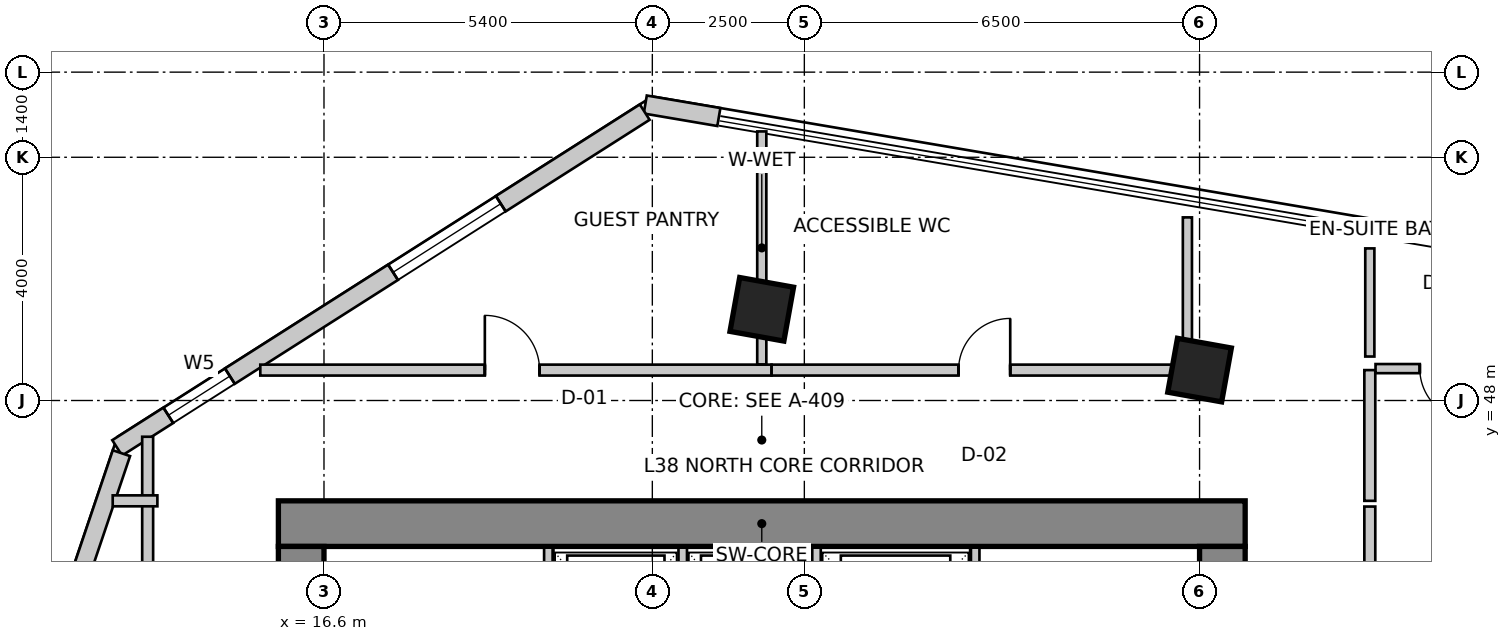
"""IFC4 building model, lengths in metres.
Left out: names, types, materials, properties, quantities, classifications, styles, units other than length and angle.
Written with IfcOpenShell. Run it as: python <this file> out.ifc"""

import sys

from ifc_helpers import new_model, si_unit, direction, frame, frame_2d, origin, origin_2d, place, context, subcontext, project, spatial, rectangle, extrude, source, transform, mapped, element, fill, save


model = new_model("IFC4")
c1 = context("Model", 3, precision=1e-05, world=origin(), true_north=direction((0.0, 1.0)))
c2 = subcontext(c1, "Body", "Model", "MODEL_VIEW")
j1 = project(units=[si_unit("LENGTHUNIT", "METRE"), si_unit("PLANEANGLEUNIT", "RADIAN")], contexts=[c1])
p1 = place(None, origin())
s1 = spatial("IfcSite", under=j1, at=p1, CompositionType="ELEMENT")
p2 = place(p1, origin())
s2 = spatial("IfcBuilding", under=s1, at=p2, CompositionType="ELEMENT")
p3 = place(p2, frame((0.0, 0.0, 153.8)))
s3 = spatial("IfcBuildingStorey", under=s2, at=p3, CompositionType="ELEMENT", Elevation=153.8)
p4 = place(p3, frame((15.85, 45.975, 0.0), z_axis=(0.0, 0.0, 1.0), x_axis=(1.0, 0.0, 0.0)))
e1 = element("IfcWall", 1, at=p4, inside=s3, PredefinedType="SHEAR", context=c2, shape_type="SweptSolid", body=[
    extrude(rectangle(XDim=15.9, YDim=0.75, at=frame_2d((7.95, 0.0))), origin(), (0.0, 0.0, 1.0), 3.6),
])
p5 = place(p3, frame((16.225, 34.2, 0.0), z_axis=(0.0, 0.0, 1.0), x_axis=(0.0, 1.0, 0.0)))
e2 = element("IfcWall", 2, at=p5, inside=s3, PredefinedType="SHEAR", context=c2, shape_type="SweptSolid", body=[
    extrude(rectangle(XDim=11.4, YDim=0.75, at=frame_2d((5.7, 0.0))), origin(), (0.0, 0.0, 1.0), 3.6),
])
m1 = source(origin(), c2, "Body", "SweptSolid", [
    extrude(rectangle(XDim=1.1, YDim=2.15, at=frame_2d((0.55, 1.075))), frame((0.0, 0.385, 0.0), z_axis=(0.0, -1.0, 0.0), x_axis=(1.0, 0.0, 0.0)), (0.0, 0.0, 1.0), 0.77),
])
p6 = place(p5, frame((7.15, 0.0, 0.0)))
e3 = element("IfcOpeningElement", 3, at=p6, cuts=e2, PredefinedType="OPENING", context=c2, shape_type="MappedRepresentation", body=[
    mapped(m1, transform((0.0, 0.0, 0.0), scale=1.0)),
])
p7 = place(p3, frame((31.375, 34.2, 0.0), z_axis=(0.0, 0.0, 1.0), x_axis=(0.0, 1.0, 0.0)))
e4 = element("IfcWall", 4, at=p7, inside=s3, PredefinedType="SHEAR", context=c2, shape_type="SweptSolid", body=[
    extrude(rectangle(XDim=11.4, YDim=0.75, at=frame_2d((5.7, 0.0))), origin(), (0.0, 0.0, 1.0), 3.6),
])
p8 = place(p7, frame((7.35, 0.0, 0.0)))
e5 = element("IfcOpeningElement", 5, at=p8, cuts=e4, PredefinedType="OPENING", context=c2, shape_type="MappedRepresentation", body=[
    mapped(m1, transform((0.0, 0.0, 0.0), scale=1.0)),
])
m2 = source(origin(), c2, "Body", "SweptSolid", [
    extrude(rectangle(XDim=0.9, YDim=0.9, at=origin_2d()), origin(), (0.0, 0.0, 1.0), 3.6),
])
for number, where, z_axis, x_axis in (
    (6, (23.8, 49.5, 0.0), (0.0, 0.0, 1.0), (0.984, -0.177, 0.0)),
    (7, (31.0, 48.5, 0.0), (0.0, 0.0, 1.0), (0.984, -0.177, 0.0)),
):
    element("IfcColumn", number, at=place(p3, frame(where, z_axis=z_axis, x_axis=x_axis)), inside=s3, PredefinedType="COLUMN", context=c2, shape_type="MappedRepresentation", body=[
        mapped(m2, transform((0.0, 0.0, 0.0), scale=1.0)),
    ])
p9 = place(p3, frame((23.094, 52.662, 0.0), z_axis=(0.0, 0.0, 1.0), x_axis=(-0.985845658291, 0.167655414553, 0.0)))
e8 = element("IfcWall", 8, at=p9, inside=s3, PredefinedType="SOLIDWALL", context=c2, shape_type="SweptSolid", body=[
    extrude(rectangle(XDim=1.228, YDim=0.3, at=frame_2d((0.614, 0.0))), origin(), (0.0, 0.0, 1.0), 3.35),
])
p10 = place(p3, frame((21.875, 52.742, 0.0), z_axis=(0.0, 0.0, 1.0), x_axis=(-0.843662465249, -0.536873956092, 0.0)))
e9 = element("IfcWall", 9, at=p10, inside=s3, PredefinedType="SOLIDWALL", context=c2, shape_type="SweptSolid", body=[
    extrude(rectangle(XDim=10.284, YDim=0.3, at=frame_2d((5.142, 0.0))), origin(), (0.0, 0.0, 1.0), 3.35),
])
m3 = source(origin(), c2, "Body", "SweptSolid", [
    extrude(rectangle(XDim=2.1, YDim=2.0, at=frame_2d((1.05, 1.0))), frame((0.0, 0.16, 0.0), z_axis=(0.0, -1.0, 0.0), x_axis=(1.0, 0.0, 0.0)), (0.0, 0.0, 1.0), 0.32),
])
p11 = place(p10, frame((2.806, 0.0, 0.85)))
e10 = element("IfcOpeningElement", 10, at=p11, cuts=e9, PredefinedType="OPENING", context=c2, shape_type="MappedRepresentation", body=[
    mapped(m3, transform((0.0, 0.0, 0.0), scale=1.0)),
])
m4 = source(origin(), c2, "Body", "SweptSolid", [
    extrude(rectangle(XDim=1.2, YDim=1.6, at=frame_2d((0.6, 0.8))), frame((0.0, 0.16, 0.0), z_axis=(0.0, -1.0, 0.0), x_axis=(1.0, 0.0, 0.0)), (0.0, 0.0, 1.0), 0.32),
])
p12 = place(p10, frame((8.087, 0.0, 0.85)))
e11 = element("IfcOpeningElement", 11, at=p12, cuts=e9, PredefinedType="OPENING", context=c2, shape_type="MappedRepresentation", body=[
    mapped(m4, transform((0.0, 0.0, 0.0), scale=1.0)),
])
p13 = place(p3, frame((13.269, 47.134, 0.0), z_axis=(0.0, 0.0, 1.0), x_axis=(-0.319929773322, -0.947441259468, 0.0)))
e12 = element("IfcWall", 12, at=p13, inside=s3, PredefinedType="SOLIDWALL", context=c2, shape_type="SweptSolid", body=[
    extrude(rectangle(XDim=16.134, YDim=0.3, at=frame_2d((8.067, 0.0))), origin(), (0.0, 0.0, 1.0), 3.35),
])
m5 = source(origin(), c2, "Body", "SweptSolid", [
    extrude(rectangle(XDim=2.4, YDim=2.2, at=frame_2d((1.2, 1.1))), frame((0.0, 0.16, 0.0), z_axis=(0.0, -1.0, 0.0), x_axis=(1.0, 0.0, 0.0)), (0.0, 0.0, 1.0), 0.32),
])
p14 = place(p13, frame((2.276, 0.0, 0.85)))
e13 = element("IfcOpeningElement", 13, at=p14, cuts=e12, PredefinedType="OPENING", context=c2, shape_type="MappedRepresentation", body=[
    mapped(m5, transform((0.0, 0.0, 0.0), scale=1.0)),
])
p15 = place(p13, frame((7.361, 0.0, 0.85)))
e14 = element("IfcOpeningElement", 14, at=p15, cuts=e12, PredefinedType="OPENING", context=c2, shape_type="MappedRepresentation", body=[
    mapped(m3, transform((0.0, 0.0, 0.0), scale=1.0)),
])
p16 = place(p13, frame((12.146, 0.0, 0.85)))
e15 = element("IfcOpeningElement", 15, at=p16, cuts=e12, PredefinedType="OPENING", context=c2, shape_type="MappedRepresentation", body=[
    mapped(m5, transform((0.0, 0.0, 0.0), scale=1.0)),
])
for number, where, z_axis, x_axis in (
    (16, (20.29, 43.28, 0.0), (0.0, 0.0, 1.0), (0.0, 1.0, 0.0)),
    (17, (27.31, 43.28, 0.0), (0.0, 0.0, 1.0), (0.0, 1.0, 0.0)),
):
    element("IfcWall", number, at=place(p3, frame(where, z_axis=z_axis, x_axis=x_axis)), inside=s3, PredefinedType="SOLIDWALL", context=c2, shape_type="SweptSolid", body=[
        extrude(rectangle(XDim=2.3, YDim=0.14, at=frame_2d((1.15, 0.0))), origin(), (0.0, 0.0, 1.0), 3.35),
    ])
for number, where, z_axis, x_axis in (
    (18, (22.5, 43.02, 0.0), (0.0, 0.0, 1.0), (0.0, 1.0, 0.0)),
    (19, (24.7, 43.02, 0.0), (0.0, 0.0, 1.0), (0.0, 1.0, 0.0)),
):
    element("IfcWall", number, at=place(p3, frame(where, z_axis=z_axis, x_axis=x_axis)), inside=s3, PredefinedType="SOLIDWALL", context=c2, shape_type="SweptSolid", body=[
        extrude(rectangle(XDim=2.56, YDim=0.14, at=frame_2d((1.28, 0.0))), origin(), (0.0, 0.0, 1.0), 3.35),
    ])
p17 = place(p3, frame((13.7, 33.544, 0.0), z_axis=(0.0, 0.0, 1.0), x_axis=(0.0, 1.0, 0.0)))
e20 = element("IfcWall", 20, at=p17, inside=s3, PredefinedType="PARTITIONING", context=c2, shape_type="SweptSolid", body=[
    extrude(rectangle(XDim=13.86, YDim=0.18, at=frame_2d((6.93, 0.0))), origin(), (0.0, 0.0, 1.0), 2.492),
])
m6 = source(origin(), c2, "Body", "SweptSolid", [
    extrude(rectangle(XDim=0.9, YDim=2.15, at=frame_2d((0.45, 1.075))), frame((0.0, 0.1, 0.0), z_axis=(0.0, -1.0, 0.0), x_axis=(1.0, 0.0, 0.0)), (0.0, 0.0, 1.0), 0.2),
])
p18 = place(p17, frame((4.253, 0.0, 0.0)))
e21 = element("IfcOpeningElement", 21, at=p18, cuts=e20, PredefinedType="OPENING", context=c2, shape_type="MappedRepresentation", body=[
    mapped(m6, transform((0.0, 0.0, 0.0), scale=1.0)),
])
p19 = place(p3, frame((13.86, 46.35, 0.0), z_axis=(0.0, 0.0, 1.0), x_axis=(-1.0, 0.0, 0.0)))
e22 = element("IfcWall", 22, at=p19, inside=s3, PredefinedType="PARTITIONING", context=c2, shape_type="SweptSolid", body=[
    extrude(rectangle(XDim=0.735, YDim=0.18, at=frame_2d((0.367, 0.0))), origin(), (0.0, 0.0, 1.0), 3.35),
])
p20 = place(p3, frame((15.552, 48.5, 0.0), z_axis=(0.0, 0.0, 1.0), x_axis=(1.0, 0.0, 0.0)))
e23 = element("IfcWall", 23, at=p20, inside=s3, PredefinedType="PARTITIONING", context=c2, shape_type="SweptSolid", body=[
    extrude(rectangle(XDim=8.407, YDim=0.18, at=frame_2d((4.204, 0.0))), origin(), (0.0, 0.0, 1.0), 3.034),
])
p21 = place(p20, frame((3.693, 0.0, 0.0)))
e24 = element("IfcOpeningElement", 24, at=p21, cuts=e23, PredefinedType="OPENING", context=c2, shape_type="MappedRepresentation", body=[
    mapped(m6, transform((0.0, 0.0, 0.0), scale=1.0)),
])
p22 = place(p3, frame((23.962, 48.5, 0.0), z_axis=(0.0, 0.0, 1.0), x_axis=(1.0, 0.0, 0.0)))
e25 = element("IfcWall", 25, at=p22, inside=s3, PredefinedType="PARTITIONING", context=c2, shape_type="SweptSolid", body=[
    extrude(rectangle(XDim=6.998, YDim=0.18, at=frame_2d((3.499, 0.0))), origin(), (0.0, 0.0, 1.0), 2.492),
])
m7 = source(origin(), c2, "Body", "SweptSolid", [
    extrude(rectangle(XDim=0.85, YDim=2.15, at=frame_2d((0.425, 1.075))), frame((0.0, 0.1, 0.0), z_axis=(0.0, -1.0, 0.0), x_axis=(1.0, 0.0, 0.0)), (0.0, 0.0, 1.0), 0.2),
])
p23 = place(p22, frame((3.074, 0.0, 0.0)))
e26 = element("IfcOpeningElement", 26, at=p23, cuts=e25, PredefinedType="OPENING", context=c2, shape_type="MappedRepresentation", body=[
    mapped(m7, transform((0.0, 0.0, 0.0), scale=1.0)),
])
p24 = place(p3, frame((33.8, 48.5, 0.0), z_axis=(0.0, 0.0, 1.0), x_axis=(0.0, -1.0, 0.0)))
e27 = element("IfcWall", 27, at=p24, inside=s3, PredefinedType="PARTITIONING", context=c2, shape_type="SweptSolid", body=[
    extrude(rectangle(XDim=2.15, YDim=0.18, at=frame_2d((1.075, 0.0))), origin(), (0.0, 0.0, 1.0), 2.492),
])
p25 = place(p3, frame((33.8, 46.256, 0.0), z_axis=(0.0, 0.0, 1.0), x_axis=(0.0, -1.0, 0.0)))
e28 = element("IfcWall", 28, at=p25, inside=s3, PredefinedType="PARTITIONING", context=c2, shape_type="SweptSolid", body=[
    extrude(rectangle(XDim=4.016, YDim=0.18, at=frame_2d((2.008, 0.0))), origin(), (0.0, 0.0, 1.0), 2.922),
])
p26 = place(p3, frame((23.8, 52.425, 0.0), z_axis=(0.0, 0.0, 1.0), x_axis=(0.0, -1.0, 0.0)))
e29 = element("IfcWall", 29, at=p26, inside=s3, PredefinedType="PARTITIONING", context=c2, shape_type="SweptSolid", body=[
    extrude(rectangle(XDim=3.831, YDim=0.15, at=frame_2d((1.916, 0.0))), origin(), (0.0, 0.0, 1.0), 2.492),
])
p27 = place(p3, frame((36.2, 48.524, 0.0), z_axis=(0.0, 0.0, 1.0), x_axis=(-1.0, 0.0, 0.0)))
e30 = element("IfcWall", 30, at=p27, inside=s3, PredefinedType="PARTITIONING", context=c2, shape_type="SweptSolid", body=[
    extrude(rectangle(XDim=2.306, YDim=0.15, at=frame_2d((1.153, 0.0))), origin(), (0.0, 0.0, 1.0), 3.35),
])
m8 = source(origin(), c2, "Body", "SweptSolid", [
    extrude(rectangle(XDim=0.85, YDim=2.15, at=frame_2d((0.425, 1.075))), frame((0.0, 0.085, 0.0), z_axis=(0.0, -1.0, 0.0), x_axis=(1.0, 0.0, 0.0)), (0.0, 0.0, 1.0), 0.17),
])
p28 = place(p27, frame((0.728, 0.0, 0.0)))
e31 = element("IfcOpeningElement", 31, at=p28, cuts=e30, PredefinedType="OPENING", context=c2, shape_type="MappedRepresentation", body=[
    mapped(m8, transform((0.0, 0.0, 0.0), scale=1.0)),
])
p29 = place(p3, frame((30.8, 51.011, 0.0), z_axis=(0.0, 0.0, 1.0), x_axis=(0.0, -1.0, 0.0)))
e32 = element("IfcWall", 32, at=p29, inside=s3, PredefinedType="PARTITIONING", context=c2, shape_type="SweptSolid", body=[
    extrude(rectangle(XDim=2.292, YDim=0.15, at=frame_2d((1.146, 0.0))), origin(), (0.0, 0.0, 1.0), 3.35),
])
p30 = place(p3, frame((33.8, 48.723, 0.0), z_axis=(0.0, 0.0, 1.0), x_axis=(0.0, 1.0, 0.0)))
e33 = element("IfcWall", 33, at=p30, inside=s3, PredefinedType="PARTITIONING", context=c2, shape_type="SweptSolid", body=[
    extrude(rectangle(XDim=1.778, YDim=0.15, at=frame_2d((0.889, 0.0))), origin(), (0.0, 0.0, 1.0), 3.35),
])
m9 = source(origin(), c2, "Body", "SweptSolid", [
    extrude(rectangle(XDim=2.1, YDim=2.0, at=frame_2d((1.05, 1.0))), frame((0.0, -0.015, 0.0), z_axis=(0.0, -1.0, 0.0), x_axis=(1.0, 0.0, 0.0)), (0.0, 0.0, 1.0), 0.06),
])
p31 = place(p11, origin())
e34 = element("IfcWindow", 34, at=p31, inside=s3, PartitioningType="SINGLE_PANEL", PredefinedType="WINDOW", context=c2, shape_type="MappedRepresentation", body=[
    mapped(m9, transform((0.0, 0.0, 0.0), scale=1.0)),
])
fill(e10, e34)
m10 = source(origin(), c2, "Body", "SweptSolid", [
    extrude(rectangle(XDim=1.2, YDim=1.6, at=frame_2d((0.6, 0.8))), frame((0.0, -0.015, 0.0), z_axis=(0.0, -1.0, 0.0), x_axis=(1.0, 0.0, 0.0)), (0.0, 0.0, 1.0), 0.06),
])
p32 = place(p12, origin())
e35 = element("IfcWindow", 35, at=p32, inside=s3, PartitioningType="SINGLE_PANEL", PredefinedType="WINDOW", context=c2, shape_type="MappedRepresentation", body=[
    mapped(m10, transform((0.0, 0.0, 0.0), scale=1.0)),
])
fill(e11, e35)
m11 = source(origin(), c2, "Body", "SweptSolid", [
    extrude(rectangle(XDim=0.9, YDim=2.15, at=frame_2d((0.45, 1.075))), frame((0.0, 0.025, 0.0), z_axis=(0.0, -1.0, 0.0), x_axis=(1.0, 0.0, 0.0)), (0.0, 0.0, 1.0), 0.05),
])
p33 = place(p21, origin())
e36 = element("IfcDoor", 36, at=p33, inside=s3, OperationType="SINGLE_SWING_LEFT", PredefinedType="DOOR", context=c2, shape_type="MappedRepresentation", body=[
    mapped(m11, transform((0.0, 0.0, 0.0), scale=1.0)),
])
fill(e24, e36)
m12 = source(origin(), c2, "Body", "SweptSolid", [
    extrude(rectangle(XDim=0.85, YDim=2.15, at=frame_2d((0.425, 1.075))), frame((0.0, 0.025, 0.0), z_axis=(0.0, -1.0, 0.0), x_axis=(1.0, 0.0, 0.0)), (0.0, 0.0, 1.0), 0.05),
])
p34 = place(p23, origin())
e37 = element("IfcDoor", 37, at=p34, inside=s3, OperationType="SINGLE_SWING_RIGHT", PredefinedType="DOOR", context=c2, shape_type="MappedRepresentation", body=[
    mapped(m12, transform((0.0, 0.0, 0.0), scale=1.0)),
])
fill(e26, e37)
p35 = place(p28, origin())
e38 = element("IfcDoor", 38, at=p35, inside=s3, OperationType="SINGLE_SWING_LEFT", PredefinedType="DOOR", context=c2, shape_type="MappedRepresentation", body=[
    mapped(m12, transform((0.0, 0.0, 0.0), scale=1.0)),
])
fill(e31, e38)
save(model, sys.argv[1])
